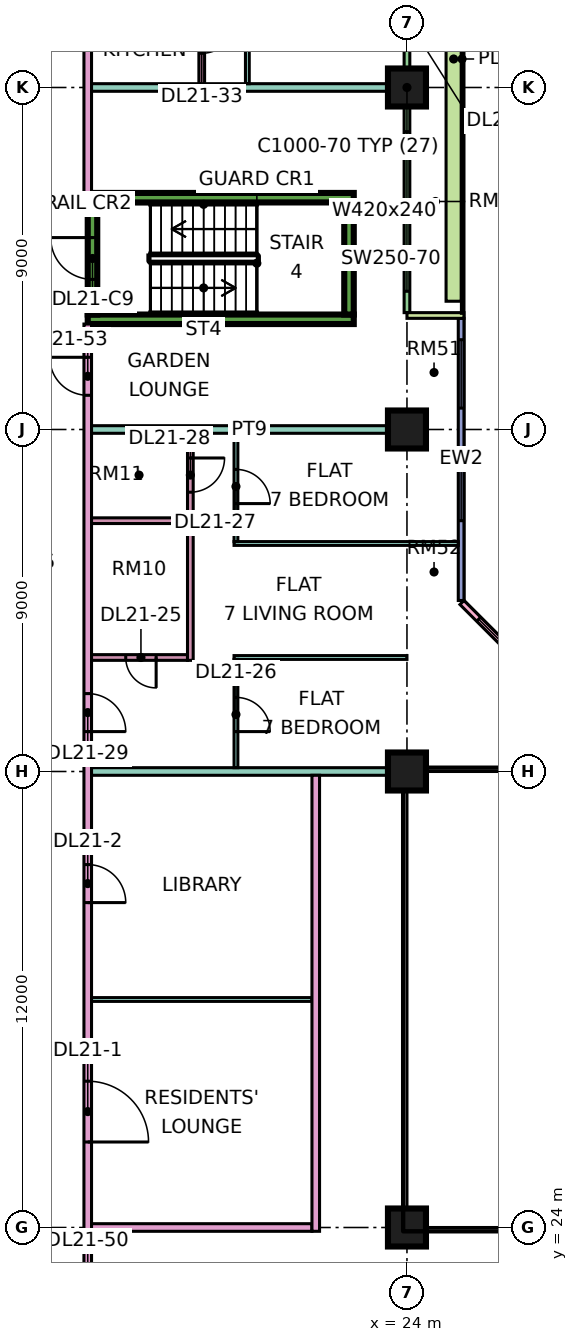
"""IFC4 building model, lengths in metres.
Left out: names, types, materials, properties, quantities, classifications, styles, units other than length and angle.
Written with IfcOpenShell. Run it as: python <this file> out.ifc"""

import sys

from ifc_helpers import new_model, si_unit, direction, frame, frame_2d, origin, origin_2d, place, context, subcontext, project, spatial, rectangle, extrude, element, fill, save


model = new_model("IFC4")
c1 = context("Model", 3, precision=1e-05, world=origin(), true_north=direction((0.0, 1.0)))
c2 = subcontext(c1, "Body", "Model", "MODEL_VIEW")
j1 = project(units=[si_unit("LENGTHUNIT", "METRE"), si_unit("PLANEANGLEUNIT", "RADIAN")], contexts=[c1])
p1 = place(None, origin())
s1 = spatial("IfcSite", under=j1, at=p1, CompositionType="ELEMENT")
p2 = place(p1, origin())
s2 = spatial("IfcBuilding", under=s1, at=p2, CompositionType="ELEMENT")
p3 = place(p2, frame((0.0, 0.0, 95.65)))
s3 = spatial("IfcBuildingStorey", under=s2, at=p3, CompositionType="ELEMENT", Elevation=95.65)
for number, where, z_axis, x_axis in (
    (1, (24.0, 24.0, 0.0), (0.0, 0.0, 1.0), (1.0, 0.0, 0.0)),
    (2, (24.0, 36.0, 0.0), (0.0, 0.0, 1.0), (1.0, 0.0, 0.0)),
    (3, (24.0, 45.0, 0.0), (0.0, 0.0, 1.0), (1.0, 0.0, 0.0)),
    (4, (24.0, 54.0, 0.0), (0.0, 0.0, 1.0), (1.0, 0.0, 0.0)),
):
    element("IfcColumn", number, at=place(p3, frame(where, z_axis=z_axis, x_axis=x_axis)), inside=s3, PredefinedType="COLUMN", context=c2, shape_type="SweptSolid", body=[
        extrude(rectangle(XDim=1.0, YDim=1.0, at=origin_2d()), origin(), (0.0, 0.0, 1.0), 3.75),
    ])
for number, where, z_axis, x_axis in (
    (5, (15.6, 47.9, 0.0), (0.0, 0.0, 1.0), (1.0, 0.0, 0.0)),
    (6, (15.6, 51.1, 0.0), (0.0, 0.0, 1.0), (1.0, 0.0, 0.0)),
):
    element("IfcWall", number, at=place(p3, frame(where, z_axis=z_axis, x_axis=x_axis)), inside=s3, PredefinedType="SHEAR", context=c2, shape_type="SweptSolid", body=[
        extrude(rectangle(XDim=7.0, YDim=0.25, at=frame_2d((3.5, 0.0))), origin(), (0.0, 0.0, 1.0), 3.75),
    ])
p4 = place(p3, frame((15.725, 48.025, 0.0), z_axis=(0.0, 0.0, 1.0), x_axis=(0.0, 1.0, 0.0)))
e7 = element("IfcWall", 7, at=p4, inside=s3, PredefinedType="SHEAR", context=c2, shape_type="SweptSolid", body=[
    extrude(rectangle(XDim=2.95, YDim=0.25, at=frame_2d((1.475, 0.0))), origin(), (0.0, 0.0, 1.0), 3.75),
])
p5 = place(p4, frame((0.925, 0.0, 0.0)))
e8 = element("IfcOpeningElement", 8, at=p5, cuts=e7, PredefinedType="OPENING", context=c2, shape_type="SweptSolid", body=[
    extrude(rectangle(XDim=1.1, YDim=2.2, at=frame_2d((0.55, 1.1))), frame((0.0, 0.135, 0.0), z_axis=(0.0, -1.0, 0.0), x_axis=(1.0, 0.0, 0.0)), (0.0, 0.0, 1.0), 0.27),
])
p6 = place(p3, frame((22.475, 48.025, 0.0), z_axis=(0.0, 0.0, 1.0), x_axis=(0.0, 1.0, 0.0)))
e9 = element("IfcWall", 9, at=p6, inside=s3, PredefinedType="SHEAR", context=c2, shape_type="SweptSolid", body=[
    extrude(rectangle(XDim=2.95, YDim=0.25, at=frame_2d((1.475, 0.0))), origin(), (0.0, 0.0, 1.0), 3.75),
])
p7 = place(p3, frame((28.447, 37.447, 0.0), z_axis=(0.0, 0.0, 1.0), x_axis=(-0.707106781187, 0.707106781187, 0.0)))
e10 = element("IfcWall", 10, at=p7, inside=s3, PredefinedType="SOLIDWALL", context=c2, shape_type="SweptSolid", body=[
    extrude(rectangle(XDim=4.243, YDim=0.15, at=frame_2d((2.121, 0.0))), origin(), (0.0, 0.0, 1.0), 3.35),
])
p8 = place(p7, frame((0.621, 0.0, 0.45)))
e11 = element("IfcOpeningElement", 11, at=p8, cuts=e10, PredefinedType="OPENING", context=c2, shape_type="SweptSolid", body=[
    extrude(rectangle(XDim=3.0, YDim=2.4, at=frame_2d((1.5, 1.2))), frame((0.0, 0.085, 0.0), z_axis=(0.0, -1.0, 0.0), x_axis=(1.0, 0.0, 0.0)), (0.0, 0.0, 1.0), 0.17),
])
p9 = place(p3, frame((25.425, 40.5, 0.0), z_axis=(0.0, 0.0, 1.0), x_axis=(0.0, 1.0, 0.0)))
e12 = element("IfcWall", 12, at=p9, inside=s3, PredefinedType="SOLIDWALL", context=c2, shape_type="SweptSolid", body=[
    extrude(rectangle(XDim=7.425, YDim=0.15, at=frame_2d((3.712, 0.0))), origin(), (0.0, 0.0, 1.0), 3.35),
])
p10 = place(p9, frame((2.1, 0.0, 0.45)))
e13 = element("IfcOpeningElement", 13, at=p10, cuts=e12, PredefinedType="OPENING", context=c2, shape_type="SweptSolid", body=[
    extrude(rectangle(XDim=1.8, YDim=2.4, at=frame_2d((0.9, 1.2))), frame((0.0, 0.085, 0.0), z_axis=(0.0, -1.0, 0.0), x_axis=(1.0, 0.0, 0.0)), (0.0, 0.0, 1.0), 0.17),
])
p11 = place(p9, frame((5.062, 0.0, 0.45)))
e14 = element("IfcOpeningElement", 14, at=p11, cuts=e12, PredefinedType="OPENING", context=c2, shape_type="SweptSolid", body=[
    extrude(rectangle(XDim=1.8, YDim=2.4, at=frame_2d((0.9, 1.2))), frame((0.0, 0.085, 0.0), z_axis=(0.0, -1.0, 0.0), x_axis=(1.0, 0.0, 0.0)), (0.0, 0.0, 1.0), 0.17),
])
p12 = place(p3, frame((24.0, 48.075, 0.0), z_axis=(0.0, 0.0, 1.0), x_axis=(0.0, 1.0, 0.0)))
e15 = element("IfcWall", 15, at=p12, inside=s3, PredefinedType="SOLIDWALL", context=c2, shape_type="SweptSolid", body=[
    extrude(rectangle(XDim=13.35, YDim=0.15, at=frame_2d((6.675, 0.0))), origin(), (0.0, 0.0, 1.0), 3.35),
])
p13 = place(p12, frame((0.562, 0.0, 0.45)))
e16 = element("IfcOpeningElement", 16, at=p13, cuts=e15, PredefinedType="OPENING", context=c2, shape_type="SweptSolid", body=[
    extrude(rectangle(XDim=4.2, YDim=2.4, at=frame_2d((2.1, 1.2))), frame((0.0, 0.085, 0.0), z_axis=(0.0, -1.0, 0.0), x_axis=(1.0, 0.0, 0.0)), (0.0, 0.0, 1.0), 0.17),
])
p14 = place(p12, frame((7.125, 0.0, 0.0)))
e17 = element("IfcOpeningElement", 17, at=p14, cuts=e15, PredefinedType="OPENING", context=c2, shape_type="SweptSolid", body=[
    extrude(rectangle(XDim=1.2, YDim=2.4, at=frame_2d((0.6, 1.2))), frame((0.0, 0.085, 0.0), z_axis=(0.0, -1.0, 0.0), x_axis=(1.0, 0.0, 0.0)), (0.0, 0.0, 1.0), 0.17),
])
p15 = place(p12, frame((9.525, 0.0, 0.45)))
e18 = element("IfcOpeningElement", 18, at=p15, cuts=e15, PredefinedType="OPENING", context=c2, shape_type="SweptSolid", body=[
    extrude(rectangle(XDim=1.8, YDim=2.4, at=frame_2d((0.9, 1.2))), frame((0.0, 0.085, 0.0), z_axis=(0.0, -1.0, 0.0), x_axis=(1.0, 0.0, 0.0)), (0.0, 0.0, 1.0), 0.17),
])
p16 = place(p12, frame((12.188, 0.0, 0.45)))
e19 = element("IfcOpeningElement", 19, at=p16, cuts=e15, PredefinedType="OPENING", context=c2, shape_type="SweptSolid", body=[
    extrude(rectangle(XDim=0.9, YDim=2.4, at=frame_2d((0.45, 1.2))), frame((0.0, 0.085, 0.0), z_axis=(0.0, -1.0, 0.0), x_axis=(1.0, 0.0, 0.0)), (0.0, 0.0, 1.0), 0.17),
])
p17 = place(p3, frame((25.5, 48.0, 0.0), z_axis=(0.0, 0.0, 1.0), x_axis=(-1.0, 0.0, 0.0)))
e20 = element("IfcWall", 20, at=p17, inside=s3, PredefinedType="SOLIDWALL", context=c2, shape_type="SweptSolid", body=[
    extrude(rectangle(XDim=1.5, YDim=0.15, at=frame_2d((0.75, 0.0))), origin(), (0.0, 0.0, 1.0), 3.35),
])
p18 = place(p3, frame((25.229, 48.375, 0.0), z_axis=(0.0, 0.0, 1.0), x_axis=(0.0, 1.0, 0.0)))
e21 = element("IfcWall", 21, at=p18, inside=s3, PredefinedType="SOLIDWALL", context=c2, shape_type="SweptSolid", body=[
    extrude(rectangle(XDim=12.75, YDim=0.4, at=frame_2d((6.375, 0.0))), origin(), (0.0, 0.0, 1.0), 0.7),
])
p19 = place(p3, frame((15.6, 20.0, 0.0), z_axis=(0.0, 0.0, 1.0), x_axis=(0.0, 1.0, 0.0)))
e22 = element("IfcWall", 22, at=p19, inside=s3, PredefinedType="PARTITIONING", context=c2, shape_type="SweptSolid", body=[
    extrude(rectangle(XDim=27.775, YDim=0.2, at=frame_2d((13.887, 0.0))), origin(), (0.0, 0.0, 1.0), 3.35),
])
p20 = place(p19, frame((6.25, 0.0, 0.0)))
e23 = element("IfcOpeningElement", 23, at=p20, cuts=e22, PredefinedType="OPENING", context=c2, shape_type="SweptSolid", body=[
    extrude(rectangle(XDim=1.6, YDim=2.1, at=frame_2d((0.8, 1.05))), frame((0.0, 0.11, 0.0), z_axis=(0.0, -1.0, 0.0), x_axis=(1.0, 0.0, 0.0)), (0.0, 0.0, 1.0), 0.22),
])
p21 = place(p19, frame((12.55, 0.0, 0.0)))
e24 = element("IfcOpeningElement", 24, at=p21, cuts=e22, PredefinedType="OPENING", context=c2, shape_type="SweptSolid", body=[
    extrude(rectangle(XDim=1.0, YDim=2.1, at=frame_2d((0.5, 1.05))), frame((0.0, 0.11, 0.0), z_axis=(0.0, -1.0, 0.0), x_axis=(1.0, 0.0, 0.0)), (0.0, 0.0, 1.0), 0.22),
])
p22 = place(p19, frame((17.05, 0.0, 0.0)))
e25 = element("IfcOpeningElement", 25, at=p22, cuts=e22, PredefinedType="OPENING", context=c2, shape_type="SweptSolid", body=[
    extrude(rectangle(XDim=1.0, YDim=2.1, at=frame_2d((0.5, 1.05))), frame((0.0, 0.11, 0.0), z_axis=(0.0, -1.0, 0.0), x_axis=(1.0, 0.0, 0.0)), (0.0, 0.0, 1.0), 0.22),
])
p23 = place(p19, frame((1.15, 0.0, 0.0)))
e26 = element("IfcOpeningElement", 26, at=p23, cuts=e22, PredefinedType="OPENING", context=c2, shape_type="SweptSolid", body=[
    extrude(rectangle(XDim=1.8, YDim=2.1, at=frame_2d((0.9, 1.05))), frame((0.0, 0.11, 0.0), z_axis=(0.0, -1.0, 0.0), x_axis=(1.0, 0.0, 0.0)), (0.0, 0.0, 1.0), 0.22),
])
p24 = place(p19, frame((25.9, 0.0, 0.0)))
e27 = element("IfcOpeningElement", 27, at=p24, cuts=e22, PredefinedType="OPENING", context=c2, shape_type="SweptSolid", body=[
    extrude(rectangle(XDim=1.0, YDim=2.1, at=frame_2d((0.5, 1.05))), frame((0.0, 0.11, 0.0), z_axis=(0.0, -1.0, 0.0), x_axis=(1.0, 0.0, 0.0)), (0.0, 0.0, 1.0), 0.22),
])
p25 = place(p3, frame((15.6, 51.225, 0.0), z_axis=(0.0, 0.0, 1.0), x_axis=(0.0, 1.0, 0.0)))
e28 = element("IfcWall", 28, at=p25, inside=s3, PredefinedType="PARTITIONING", context=c2, shape_type="SweptSolid", body=[
    extrude(rectangle(XDim=13.125, YDim=0.2, at=frame_2d((6.562, 0.0))), origin(), (0.0, 0.0, 1.0), 3.35),
])
p26 = place(p25, frame((9.825, 0.0, 0.0)))
e29 = element("IfcOpeningElement", 29, at=p26, cuts=e28, PredefinedType="OPENING", context=c2, shape_type="SweptSolid", body=[
    extrude(rectangle(XDim=1.0, YDim=2.1, at=frame_2d((0.5, 1.05))), frame((0.0, 0.11, 0.0), z_axis=(0.0, -1.0, 0.0), x_axis=(1.0, 0.0, 0.0)), (0.0, 0.0, 1.0), 0.22),
])
p27 = place(p3, frame((15.7, 24.0, 0.0), z_axis=(0.0, 0.0, 1.0), x_axis=(1.0, 0.0, 0.0)))
e30 = element("IfcWall", 30, at=p27, inside=s3, PredefinedType="PARTITIONING", context=c2, shape_type="SweptSolid", body=[
    extrude(rectangle(XDim=5.8, YDim=0.2, at=frame_2d((2.9, 0.0))), origin(), (0.0, 0.0, 1.0), 3.35),
])
p28 = place(p3, frame((15.7, 30.0, 0.0), z_axis=(0.0, 0.0, 1.0), x_axis=(1.0, 0.0, 0.0)))
e31 = element("IfcWall", 31, at=p28, inside=s3, PredefinedType="PARTITIONING", context=c2, shape_type="SweptSolid", body=[
    extrude(rectangle(XDim=5.8, YDim=0.1, at=frame_2d((2.9, 0.0))), origin(), (0.0, 0.0, 1.0), 3.35),
])
p29 = place(p3, frame((15.7, 36.0, 0.0), z_axis=(0.0, 0.0, 1.0), x_axis=(1.0, 0.0, 0.0)))
e32 = element("IfcWall", 32, at=p29, inside=s3, PredefinedType="PARTITIONING", context=c2, shape_type="SweptSolid", body=[
    extrude(rectangle(XDim=8.3, YDim=0.2, at=frame_2d((4.15, 0.0))), origin(), (0.0, 0.0, 1.0), 3.35),
])
p30 = place(p3, frame((15.7, 39.0, 0.0), z_axis=(0.0, 0.0, 1.0), x_axis=(1.0, 0.0, 0.0)))
e33 = element("IfcWall", 33, at=p30, inside=s3, PredefinedType="PARTITIONING", context=c2, shape_type="SweptSolid", body=[
    extrude(rectangle(XDim=2.525, YDim=0.15, at=frame_2d((1.263, 0.0))), origin(), (0.0, 0.0, 1.0), 3.35),
])
p31 = place(p30, frame((0.9, 0.0, 0.0)))
e34 = element("IfcOpeningElement", 34, at=p31, cuts=e33, PredefinedType="OPENING", context=c2, shape_type="SweptSolid", body=[
    extrude(rectangle(XDim=0.8, YDim=2.1, at=frame_2d((0.4, 1.05))), frame((0.0, 0.085, 0.0), z_axis=(0.0, -1.0, 0.0), x_axis=(1.0, 0.0, 0.0)), (0.0, 0.0, 1.0), 0.17),
])
p32 = place(p3, frame((15.7, 42.6, 0.0), z_axis=(0.0, 0.0, 1.0), x_axis=(1.0, 0.0, 0.0)))
e35 = element("IfcWall", 35, at=p32, inside=s3, PredefinedType="PARTITIONING", context=c2, shape_type="SweptSolid", body=[
    extrude(rectangle(XDim=2.525, YDim=0.15, at=frame_2d((1.263, 0.0))), origin(), (0.0, 0.0, 1.0), 3.35),
])
p33 = place(p3, frame((15.7, 45.0, 0.0), z_axis=(0.0, 0.0, 1.0), x_axis=(1.0, 0.0, 0.0)))
e36 = element("IfcWall", 36, at=p33, inside=s3, PredefinedType="PARTITIONING", context=c2, shape_type="SweptSolid", body=[
    extrude(rectangle(XDim=8.3, YDim=0.2, at=frame_2d((4.15, 0.0))), origin(), (0.0, 0.0, 1.0), 3.35),
])
p34 = place(p3, frame((15.7, 54.0, 0.0), z_axis=(0.0, 0.0, 1.0), x_axis=(1.0, 0.0, 0.0)))
e37 = element("IfcWall", 37, at=p34, inside=s3, PredefinedType="PARTITIONING", context=c2, shape_type="SweptSolid", body=[
    extrude(rectangle(XDim=8.226, YDim=0.2, at=frame_2d((4.113, 0.0))), origin(), (0.0, 0.0, 1.0), 3.35),
])
p35 = place(p3, frame((18.3, 38.925, 0.0), z_axis=(0.0, 0.0, 1.0), x_axis=(0.0, 1.0, 0.0)))
e38 = element("IfcWall", 38, at=p35, inside=s3, PredefinedType="PARTITIONING", context=c2, shape_type="SweptSolid", body=[
    extrude(rectangle(XDim=5.975, YDim=0.15, at=frame_2d((2.987, 0.0))), origin(), (0.0, 0.0, 1.0), 3.35),
])
p36 = place(p35, frame((4.425, 0.0, 0.0)))
e39 = element("IfcOpeningElement", 39, at=p36, cuts=e38, PredefinedType="OPENING", context=c2, shape_type="SweptSolid", body=[
    extrude(rectangle(XDim=0.9, YDim=2.1, at=frame_2d((0.45, 1.05))), frame((0.0, 0.085, 0.0), z_axis=(0.0, -1.0, 0.0), x_axis=(1.0, 0.0, 0.0)), (0.0, 0.0, 1.0), 0.17),
])
p37 = place(p3, frame((18.6, 54.1, 0.0), z_axis=(0.0, 0.0, 1.0), x_axis=(0.0, 1.0, 0.0)))
e40 = element("IfcWall", 40, at=p37, inside=s3, PredefinedType="PARTITIONING", context=c2, shape_type="SweptSolid", body=[
    extrude(rectangle(XDim=5.975, YDim=0.15, at=frame_2d((2.987, 0.0))), origin(), (0.0, 0.0, 1.0), 3.35),
])
p38 = place(p37, frame((3.9, 0.0, 0.0)))
e41 = element("IfcOpeningElement", 41, at=p38, cuts=e40, PredefinedType="OPENING", context=c2, shape_type="SweptSolid", body=[
    extrude(rectangle(XDim=0.8, YDim=2.1, at=frame_2d((0.4, 1.05))), frame((0.0, 0.085, 0.0), z_axis=(0.0, -1.0, 0.0), x_axis=(1.0, 0.0, 0.0)), (0.0, 0.0, 1.0), 0.17),
])
p39 = place(p37, frame((0.8, 0.0, 0.0)))
e42 = element("IfcOpeningElement", 42, at=p39, cuts=e40, PredefinedType="OPENING", context=c2, shape_type="SweptSolid", body=[
    extrude(rectangle(XDim=0.9, YDim=2.1, at=frame_2d((0.45, 1.05))), frame((0.0, 0.085, 0.0), z_axis=(0.0, -1.0, 0.0), x_axis=(1.0, 0.0, 0.0)), (0.0, 0.0, 1.0), 0.17),
])
p40 = place(p3, frame((19.45, 39.0, 0.0), z_axis=(0.0, 0.0, 1.0), x_axis=(1.0, 0.0, 0.0)))
e43 = element("IfcWall", 43, at=p40, inside=s3, PredefinedType="PARTITIONING", context=c2, shape_type="SweptSolid", body=[
    extrude(rectangle(XDim=4.55, YDim=0.1, at=frame_2d((2.275, 0.0))), origin(), (0.0, 0.0, 1.0), 3.35),
])
p41 = place(p3, frame((19.45, 42.0, 0.0), z_axis=(0.0, 0.0, 1.0), x_axis=(1.0, 0.0, 0.0)))
e44 = element("IfcWall", 44, at=p41, inside=s3, PredefinedType="PARTITIONING", context=c2, shape_type="SweptSolid", body=[
    extrude(rectangle(XDim=5.9, YDim=0.1, at=frame_2d((2.95, 0.0))), origin(), (0.0, 0.0, 1.0), 3.35),
])
p42 = place(p3, frame((19.5, 36.1, 0.0), z_axis=(0.0, 0.0, 1.0), x_axis=(0.0, 1.0, 0.0)))
e45 = element("IfcWall", 45, at=p42, inside=s3, PredefinedType="PARTITIONING", context=c2, shape_type="SweptSolid", body=[
    extrude(rectangle(XDim=2.85, YDim=0.1, at=frame_2d((1.425, 0.0))), origin(), (0.0, 0.0, 1.0), 3.35),
])
p43 = place(p42, frame((0.95, 0.0, 0.0)))
e46 = element("IfcOpeningElement", 46, at=p43, cuts=e45, PredefinedType="OPENING", context=c2, shape_type="SweptSolid", body=[
    extrude(rectangle(XDim=0.9, YDim=2.1, at=frame_2d((0.45, 1.05))), frame((0.0, 0.06, 0.0), z_axis=(0.0, -1.0, 0.0), x_axis=(1.0, 0.0, 0.0)), (0.0, 0.0, 1.0), 0.12),
])
p44 = place(p3, frame((19.5, 42.05, 0.0), z_axis=(0.0, 0.0, 1.0), x_axis=(0.0, 1.0, 0.0)))
e47 = element("IfcWall", 47, at=p44, inside=s3, PredefinedType="PARTITIONING", context=c2, shape_type="SweptSolid", body=[
    extrude(rectangle(XDim=2.85, YDim=0.1, at=frame_2d((1.425, 0.0))), origin(), (0.0, 0.0, 1.0), 3.35),
])
p45 = place(p44, frame((1.0, 0.0, 0.0)))
e48 = element("IfcOpeningElement", 48, at=p45, cuts=e47, PredefinedType="OPENING", context=c2, shape_type="SweptSolid", body=[
    extrude(rectangle(XDim=0.9, YDim=2.1, at=frame_2d((0.45, 1.05))), frame((0.0, 0.06, 0.0), z_axis=(0.0, -1.0, 0.0), x_axis=(1.0, 0.0, 0.0)), (0.0, 0.0, 1.0), 0.12),
])
p46 = place(p3, frame((19.8, 54.1, 0.0), z_axis=(0.0, 0.0, 1.0), x_axis=(0.0, 1.0, 0.0)))
e49 = element("IfcWall", 49, at=p46, inside=s3, PredefinedType="PARTITIONING", context=c2, shape_type="SweptSolid", body=[
    extrude(rectangle(XDim=2.85, YDim=0.1, at=frame_2d((1.425, 0.0))), origin(), (0.0, 0.0, 1.0), 3.35),
])
p47 = place(p3, frame((21.6, 23.9, 0.0), z_axis=(0.0, 0.0, 1.0), x_axis=(0.0, 1.0, 0.0)))
e50 = element("IfcWall", 50, at=p47, inside=s3, PredefinedType="PARTITIONING", context=c2, shape_type="SweptSolid", body=[
    extrude(rectangle(XDim=12.0, YDim=0.2, at=frame_2d((6.0, 0.0))), origin(), (0.0, 0.0, 1.0), 3.35),
])
p48 = place(p8, origin())
e51 = element("IfcWindow", 51, at=p48, inside=s3, PartitioningType="SINGLE_PANEL", PredefinedType="WINDOW", context=c2, shape_type="SweptSolid", body=[
    extrude(rectangle(XDim=3.0, YDim=2.4, at=frame_2d((1.5, 1.2))), frame((0.0, 0.03, 0.0), z_axis=(0.0, -1.0, 0.0), x_axis=(1.0, 0.0, 0.0)), (0.0, 0.0, 1.0), 0.06),
])
fill(e11, e51)
p49 = place(p10, origin())
e52 = element("IfcWindow", 52, at=p49, inside=s3, PartitioningType="SINGLE_PANEL", PredefinedType="WINDOW", context=c2, shape_type="SweptSolid", body=[
    extrude(rectangle(XDim=1.8, YDim=2.4, at=frame_2d((0.9, 1.2))), frame((0.0, 0.03, 0.0), z_axis=(0.0, -1.0, 0.0), x_axis=(1.0, 0.0, 0.0)), (0.0, 0.0, 1.0), 0.06),
])
fill(e13, e52)
p50 = place(p11, origin())
e53 = element("IfcWindow", 53, at=p50, inside=s3, PartitioningType="SINGLE_PANEL", PredefinedType="WINDOW", context=c2, shape_type="SweptSolid", body=[
    extrude(rectangle(XDim=1.8, YDim=2.4, at=frame_2d((0.9, 1.2))), frame((0.0, 0.03, 0.0), z_axis=(0.0, -1.0, 0.0), x_axis=(1.0, 0.0, 0.0)), (0.0, 0.0, 1.0), 0.06),
])
fill(e14, e53)
p51 = place(p13, origin())
e54 = element("IfcWindow", 54, at=p51, inside=s3, PartitioningType="SINGLE_PANEL", PredefinedType="WINDOW", context=c2, shape_type="SweptSolid", body=[
    extrude(rectangle(XDim=4.2, YDim=2.4, at=frame_2d((2.1, 1.2))), frame((0.0, 0.03, 0.0), z_axis=(0.0, -1.0, 0.0), x_axis=(1.0, 0.0, 0.0)), (0.0, 0.0, 1.0), 0.06),
])
fill(e16, e54)
p52 = place(p5, frame((1.1, 0.0, 0.0), z_axis=(0.0, 0.0, 1.0), x_axis=(-1.0, 0.0, 0.0)))
e55 = element("IfcDoor", 55, at=p52, inside=s3, OperationType="SINGLE_SWING_RIGHT", PredefinedType="DOOR", context=c2, shape_type="SweptSolid", body=[
    extrude(rectangle(XDim=1.1, YDim=2.2, at=frame_2d((0.55, 1.1))), frame((0.0, 0.025, 0.0), z_axis=(0.0, -1.0, 0.0), x_axis=(1.0, 0.0, 0.0)), (0.0, 0.0, 1.0), 0.05),
])
fill(e8, e55)
p53 = place(p20, frame((1.6, 0.0, 0.0), z_axis=(0.0, 0.0, 1.0), x_axis=(-1.0, 0.0, 0.0)))
e56 = element("IfcDoor", 56, at=p53, inside=s3, OperationType="DOUBLE_DOOR_SINGLE_SWING", PredefinedType="DOOR", context=c2, shape_type="SweptSolid", body=[
    extrude(rectangle(XDim=1.6, YDim=2.1, at=frame_2d((0.8, 1.05))), frame((0.0, 0.025, 0.0), z_axis=(0.0, -1.0, 0.0), x_axis=(1.0, 0.0, 0.0)), (0.0, 0.0, 1.0), 0.05),
])
fill(e23, e56)
p54 = place(p21, frame((1.0, 0.0, 0.0), z_axis=(0.0, 0.0, 1.0), x_axis=(-1.0, 0.0, 0.0)))
e57 = element("IfcDoor", 57, at=p54, inside=s3, OperationType="SINGLE_SWING_LEFT", PredefinedType="DOOR", context=c2, shape_type="SweptSolid", body=[
    extrude(rectangle(XDim=1.0, YDim=2.1, at=frame_2d((0.5, 1.05))), frame((0.0, 0.025, 0.0), z_axis=(0.0, -1.0, 0.0), x_axis=(1.0, 0.0, 0.0)), (0.0, 0.0, 1.0), 0.05),
])
fill(e24, e57)
p55 = place(p31, origin())
e58 = element("IfcDoor", 58, at=p55, inside=s3, OperationType="SINGLE_SWING_RIGHT", PredefinedType="DOOR", context=c2, shape_type="SweptSolid", body=[
    extrude(rectangle(XDim=0.8, YDim=2.1, at=frame_2d((0.4, 1.05))), frame((0.0, 0.025, 0.0), z_axis=(0.0, -1.0, 0.0), x_axis=(1.0, 0.0, 0.0)), (0.0, 0.0, 1.0), 0.05),
])
fill(e34, e58)
p56 = place(p43, frame((0.9, 0.0, 0.0), z_axis=(0.0, 0.0, 1.0), x_axis=(-1.0, 0.0, 0.0)))
e59 = element("IfcDoor", 59, at=p56, inside=s3, OperationType="SINGLE_SWING_LEFT", PredefinedType="DOOR", context=c2, shape_type="SweptSolid", body=[
    extrude(rectangle(XDim=0.9, YDim=2.1, at=frame_2d((0.45, 1.05))), frame((0.0, 0.025, 0.0), z_axis=(0.0, -1.0, 0.0), x_axis=(1.0, 0.0, 0.0)), (0.0, 0.0, 1.0), 0.05),
])
fill(e46, e59)
p57 = place(p45, frame((0.9, 0.0, 0.0), z_axis=(0.0, 0.0, 1.0), x_axis=(-1.0, 0.0, 0.0)))
e60 = element("IfcDoor", 60, at=p57, inside=s3, OperationType="SINGLE_SWING_LEFT", PredefinedType="DOOR", context=c2, shape_type="SweptSolid", body=[
    extrude(rectangle(XDim=0.9, YDim=2.1, at=frame_2d((0.45, 1.05))), frame((0.0, 0.025, 0.0), z_axis=(0.0, -1.0, 0.0), x_axis=(1.0, 0.0, 0.0)), (0.0, 0.0, 1.0), 0.05),
])
fill(e48, e60)
p58 = place(p36, origin())
e61 = element("IfcDoor", 61, at=p58, inside=s3, OperationType="SINGLE_SWING_RIGHT", PredefinedType="DOOR", context=c2, shape_type="SweptSolid", body=[
    extrude(rectangle(XDim=0.9, YDim=2.1, at=frame_2d((0.45, 1.05))), frame((0.0, 0.025, 0.0), z_axis=(0.0, -1.0, 0.0), x_axis=(1.0, 0.0, 0.0)), (0.0, 0.0, 1.0), 0.05),
])
fill(e39, e61)
p59 = place(p22, frame((1.0, 0.0, 0.0), z_axis=(0.0, 0.0, 1.0), x_axis=(-1.0, 0.0, 0.0)))
e62 = element("IfcDoor", 62, at=p59, inside=s3, OperationType="SINGLE_SWING_LEFT", PredefinedType="DOOR", context=c2, shape_type="SweptSolid", body=[
    extrude(rectangle(XDim=1.0, YDim=2.1, at=frame_2d((0.5, 1.05))), frame((0.0, 0.025, 0.0), z_axis=(0.0, -1.0, 0.0), x_axis=(1.0, 0.0, 0.0)), (0.0, 0.0, 1.0), 0.05),
])
fill(e25, e62)
p60 = place(p39, origin())
e63 = element("IfcDoor", 63, at=p60, inside=s3, OperationType="SINGLE_SWING_RIGHT", PredefinedType="DOOR", context=c2, shape_type="SweptSolid", body=[
    extrude(rectangle(XDim=0.9, YDim=2.1, at=frame_2d((0.45, 1.05))), frame((0.0, 0.025, 0.0), z_axis=(0.0, -1.0, 0.0), x_axis=(1.0, 0.0, 0.0)), (0.0, 0.0, 1.0), 0.05),
])
fill(e42, e63)
p61 = place(p24, frame((1.0, 0.0, 0.0), z_axis=(0.0, 0.0, 1.0), x_axis=(-1.0, 0.0, 0.0)))
e64 = element("IfcDoor", 64, at=p61, inside=s3, OperationType="SINGLE_SWING_RIGHT", PredefinedType="DOOR", context=c2, shape_type="SweptSolid", body=[
    extrude(rectangle(XDim=1.0, YDim=2.1, at=frame_2d((0.5, 1.05))), frame((0.0, 0.025, 0.0), z_axis=(0.0, -1.0, 0.0), x_axis=(1.0, 0.0, 0.0)), (0.0, 0.0, 1.0), 0.05),
])
fill(e27, e64)
save(model, sys.argv[1])
